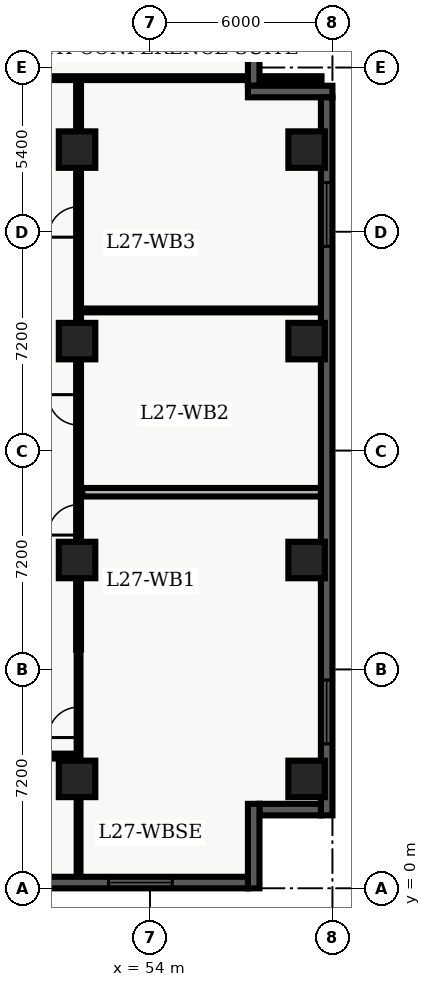
"""IFC4 building model, lengths in metres.
Left out: names, types, materials, properties, quantities, classifications, styles, units other than length and angle.
Written with IfcOpenShell. Run it as: python <this file> out.ifc"""

import sys

from ifc_helpers import new_model, entity, si_unit, converted_unit, direction, frame, origin_with_axes, origin_2d_with_axis, place, context, subcontext, project, spatial, polyline, rectangle, outline, extrude, element, fill, save


model = new_model("IFC4")
c1 = context("Model", 3, precision=1e-05, world=origin_with_axes(), true_north=direction((0.0, 1.0)))
c2 = subcontext(c1, "Body", "Model", "MODEL_VIEW")
j1 = project(units=[si_unit("LENGTHUNIT", "METRE"), converted_unit("PLANEANGLEUNIT", "DEGREE", entity("IfcPlaneAngleMeasure", 0.017), si_unit("PLANEANGLEUNIT", "RADIAN"), dimensions=[0, 0, 0, 0, 0, 0, 0])], contexts=[c1])
p1 = place(None, origin_with_axes())
s1 = spatial("IfcSite", under=j1, at=p1, CompositionType="ELEMENT")
p2 = place(p1, origin_with_axes())
s2 = spatial("IfcBuilding", under=s1, at=p2, CompositionType="ELEMENT")
p3 = place(p2, frame((0.0, 0.0, 112.5), z_axis=(0.0, 0.0, 1.0), x_axis=(1.0, 0.0, 0.0)))
s3 = spatial("IfcBuildingStorey", under=s2, at=p3, CompositionType="ELEMENT", Elevation=112.5)
for number, where, z_axis, x_axis in (
    (1, (51.6, 3.6, 0.0), (0.0, 0.0, 1.0), (1.0, 0.0, 0.0)),
    (2, (51.6, 10.8, 0.0), (0.0, 0.0, 1.0), (1.0, 0.0, 0.0)),
    (3, (51.6, 18.0, 0.0), (0.0, 0.0, 1.0), (1.0, 0.0, 0.0)),
    (4, (51.6, 24.3, 0.0), (0.0, 0.0, 1.0), (1.0, 0.0, 0.0)),
    (5, (59.15, 3.6, 0.0), (0.0, 0.0, 1.0), (1.0, 0.0, 0.0)),
    (6, (59.15, 10.8, 0.0), (0.0, 0.0, 1.0), (1.0, 0.0, 0.0)),
    (7, (59.15, 18.0, 0.0), (0.0, 0.0, 1.0), (1.0, 0.0, 0.0)),
    (8, (59.15, 24.3, 0.0), (0.0, 0.0, 1.0), (1.0, 0.0, 0.0)),
):
    element("IfcColumn", number, at=place(p3, frame(where, z_axis=z_axis, x_axis=x_axis)), inside=s3, PredefinedType="COLUMN", context=c2, shape_type="SweptSolid", body=[
        extrude(rectangle(XDim=1.2, YDim=1.2, at=origin_2d_with_axis()), origin_with_axes(), (0.0, 0.0, 1.0), 3.9),
    ])
p4 = place(p3, frame((51.65, 7.85, 0.0), z_axis=(0.0, 0.0, 1.0), x_axis=(0.0, 1.0, 0.0)))
e9 = element("IfcWall", 9, at=p4, inside=s3, PredefinedType="PARTITIONING", context=c2, shape_type="SweptSolid", body=[
    extrude(outline(polyline([(0.0, -0.08), (18.8, -0.08), (18.8, 0.08), (0.0, 0.08), (0.0, -0.08)])), origin_with_axes(), (0.0, 0.0, 1.0), 2.7),
])
p5 = place(p4, frame((4.27, 0.0, 0.0), z_axis=(0.0, 0.0, 1.0), x_axis=(1.0, 0.0, 0.0)))
e10 = element("IfcOpeningElement", 10, at=p5, cuts=e9, PredefinedType="OPENING", context=c2, shape_type="SweptSolid", body=[
    extrude(rectangle(XDim=1.0, YDim=0.18, at=origin_2d_with_axis()), origin_with_axes(), (0.0, 0.0, 1.0), 2.15),
])
p6 = place(p4, frame((7.889, 0.0, 0.0), z_axis=(0.0, 0.0, 1.0), x_axis=(1.0, 0.0, 0.0)))
e11 = element("IfcOpeningElement", 11, at=p6, cuts=e9, PredefinedType="OPENING", context=c2, shape_type="SweptSolid", body=[
    extrude(rectangle(XDim=1.0, YDim=0.18, at=origin_2d_with_axis()), origin_with_axes(), (0.0, 0.0, 1.0), 2.15),
])
p7 = place(p4, frame((14.069, 0.0, 0.0), z_axis=(0.0, 0.0, 1.0), x_axis=(1.0, 0.0, 0.0)))
e12 = element("IfcOpeningElement", 12, at=p7, cuts=e9, PredefinedType="OPENING", context=c2, shape_type="SweptSolid", body=[
    extrude(rectangle(XDim=1.0, YDim=0.18, at=origin_2d_with_axis()), origin_with_axes(), (0.0, 0.0, 1.0), 2.15),
])
p8 = place(p3, frame((38.76, 26.65, 0.0), z_axis=(0.0, 0.0, 1.0), x_axis=(1.0, 0.0, 0.0)))
e13 = element("IfcWall", 13, at=p8, inside=s3, PredefinedType="PARTITIONING", context=c2, shape_type="SweptSolid", body=[
    extrude(outline(polyline([(0.0, -0.062), (20.88, -0.062), (20.88, 0.062), (0.0, 0.062), (0.0, -0.062)])), origin_with_axes(), (0.0, 0.0, 1.0), 2.7),
])
p9 = place(p8, frame((4.24, 0.0, 0.0), z_axis=(0.0, 0.0, 1.0), x_axis=(1.0, 0.0, 0.0)))
e14 = element("IfcOpeningElement", 14, at=p9, cuts=e13, PredefinedType="OPENING", context=c2, shape_type="SweptSolid", body=[
    extrude(rectangle(XDim=1.0, YDim=0.145, at=origin_2d_with_axis()), origin_with_axes(), (0.0, 0.0, 1.0), 2.15),
])
p10 = place(p3, frame((44.55, 4.35, 0.0), z_axis=(0.0, 0.0, 1.0), x_axis=(1.0, 0.0, 0.0)))
e15 = element("IfcWall", 15, at=p10, inside=s3, PredefinedType="PARTITIONING", context=c2, shape_type="SweptSolid", body=[
    extrude(outline(polyline([(0.0, -0.08), (7.1, -0.08), (7.1, 0.08), (0.0, 0.08), (0.0, -0.08)])), origin_with_axes(), (0.0, 0.0, 1.0), 2.7),
])
p11 = place(p10, frame((1.7, 0.0, 0.0), z_axis=(0.0, 0.0, 1.0), x_axis=(1.0, 0.0, 0.0)))
e16 = element("IfcOpeningElement", 16, at=p11, cuts=e15, PredefinedType="OPENING", context=c2, shape_type="SweptSolid", body=[
    extrude(rectangle(XDim=1.0, YDim=0.18, at=origin_2d_with_axis()), origin_with_axes(), (0.0, 0.0, 1.0), 2.15),
])
p12 = place(p3, frame((51.65, 0.36, 0.0), z_axis=(0.0, 0.0, 1.0), x_axis=(0.0, 1.0, 0.0)))
e17 = element("IfcWall", 17, at=p12, inside=s3, PredefinedType="PARTITIONING", context=c2, shape_type="SweptSolid", body=[
    extrude(outline(polyline([(0.0, -0.062), (7.49, -0.062), (7.49, 0.062), (0.0, 0.062), (0.0, -0.062)])), origin_with_axes(), (0.0, 0.0, 1.0), 2.7),
])
p13 = place(p12, frame((5.1, 0.0, 0.0), z_axis=(0.0, 0.0, 1.0), x_axis=(1.0, 0.0, 0.0)))
e18 = element("IfcOpeningElement", 18, at=p13, cuts=e17, PredefinedType="OPENING", context=c2, shape_type="SweptSolid", body=[
    extrude(rectangle(XDim=1.0, YDim=0.145, at=origin_2d_with_axis()), origin_with_axes(), (0.0, 0.0, 1.0), 2.15),
])
p14 = place(p3, frame((51.77, 13.029, 0.0), z_axis=(0.0, 0.0, 1.0), x_axis=(1.0, 0.0, 0.0)))
e19 = element("IfcWall", 19, at=p14, inside=s3, PredefinedType="PARTITIONING", context=c2, shape_type="SweptSolid", body=[
    extrude(outline(polyline([(0.0, -0.14), (7.855, -0.14), (7.855, 0.14), (0.0, 0.14), (0.0, -0.14)])), origin_with_axes(), (0.0, 0.0, 1.0), 2.7),
])
p15 = place(p3, frame((51.77, 19.009, 0.0), z_axis=(0.0, 0.0, 1.0), x_axis=(1.0, 0.0, 0.0)))
e20 = element("IfcWall", 20, at=p15, inside=s3, PredefinedType="PARTITIONING", context=c2, shape_type="SweptSolid", body=[
    extrude(outline(polyline([(0.0, -0.062), (7.855, -0.062), (7.855, 0.062), (0.0, 0.062), (0.0, -0.062)])), origin_with_axes(), (0.0, 0.0, 1.0), 2.7),
])
p16 = place(p3, frame((57.41, 28.42, 0.0), z_axis=(0.0, 0.0, 1.0), x_axis=(0.0, -1.0, 0.0)))
e21 = element("IfcWall", 21, at=p16, inside=s3, PredefinedType="SOLIDWALL", context=c2, shape_type="SweptSolid", body=[
    extrude(outline(polyline([(0.0, -0.19), (2.02, -0.19), (2.02, 0.19), (0.0, 0.19), (0.0, -0.19)])), origin_with_axes(), (0.0, 0.0, 1.0), 3.66),
])
p17 = place(p3, frame((57.22, 26.21, 0.0), z_axis=(0.0, 0.0, 1.0), x_axis=(1.0, 0.0, 0.0)))
e22 = element("IfcWall", 22, at=p17, inside=s3, PredefinedType="SOLIDWALL", context=c2, shape_type="SweptSolid", body=[
    extrude(outline(polyline([(0.0, -0.19), (2.78, -0.19), (2.78, 0.19), (0.0, 0.19), (0.0, -0.19)])), origin_with_axes(), (0.0, 0.0, 1.0), 3.66),
])
p18 = place(p3, frame((59.81, 26.02, 0.0), z_axis=(0.0, 0.0, 1.0), x_axis=(0.0, -1.0, 0.0)))
e23 = element("IfcWall", 23, at=p18, inside=s3, PredefinedType="SOLIDWALL", context=c2, shape_type="SweptSolid", body=[
    extrude(outline(polyline([(0.0, -0.19), (23.62, -0.19), (23.62, 0.19), (0.0, 0.19), (0.0, -0.19)])), origin_with_axes(), (0.0, 0.0, 1.0), 3.66),
])
p19 = place(p18, frame((3.853, 0.0, 0.45), z_axis=(0.0, 0.0, 1.0), x_axis=(1.0, 0.0, 0.0)))
e24 = element("IfcOpeningElement", 24, at=p19, cuts=e23, PredefinedType="OPENING", context=c2, shape_type="SweptSolid", body=[
    extrude(rectangle(XDim=2.1, YDim=0.4, at=origin_2d_with_axis()), origin_with_axes(), (0.0, 0.0, 1.0), 2.2),
])
p20 = place(p18, frame((20.218, 0.0, 0.45), z_axis=(0.0, 0.0, 1.0), x_axis=(1.0, 0.0, 0.0)))
e25 = element("IfcOpeningElement", 25, at=p20, cuts=e23, PredefinedType="OPENING", context=c2, shape_type="SweptSolid", body=[
    extrude(rectangle(XDim=2.1, YDim=0.4, at=origin_2d_with_axis()), origin_with_axes(), (0.0, 0.0, 1.0), 2.2),
])
p21 = place(p3, frame((59.62, 2.59, 0.0), z_axis=(0.0, 0.0, 1.0), x_axis=(-1.0, 0.0, 0.0)))
e26 = element("IfcWall", 26, at=p21, inside=s3, PredefinedType="SOLIDWALL", context=c2, shape_type="SweptSolid", body=[
    extrude(outline(polyline([(0.0, -0.19), (2.02, -0.19), (2.02, 0.19), (0.0, 0.19), (0.0, -0.19)])), origin_with_axes(), (0.0, 0.0, 1.0), 3.66),
])
p22 = place(p3, frame((57.41, 2.78, 0.0), z_axis=(0.0, 0.0, 1.0), x_axis=(0.0, -1.0, 0.0)))
e27 = element("IfcWall", 27, at=p22, inside=s3, PredefinedType="SOLIDWALL", context=c2, shape_type="SweptSolid", body=[
    extrude(outline(polyline([(0.0, -0.19), (2.78, -0.19), (2.78, 0.19), (0.0, 0.19), (0.0, -0.19)])), origin_with_axes(), (0.0, 0.0, 1.0), 3.66),
])
p23 = place(p3, frame((57.22, 0.19, 0.0), z_axis=(0.0, 0.0, 1.0), x_axis=(-1.0, 0.0, 0.0)))
e28 = element("IfcWall", 28, at=p23, inside=s3, PredefinedType="SOLIDWALL", context=c2, shape_type="SweptSolid", body=[
    extrude(outline(polyline([(0.0, -0.19), (18.82, -0.19), (18.82, 0.19), (0.0, 0.19), (0.0, -0.19)])), origin_with_axes(), (0.0, 0.0, 1.0), 3.66),
])
p24 = place(p23, frame((3.537, 0.0, 0.45), z_axis=(0.0, 0.0, 1.0), x_axis=(1.0, 0.0, 0.0)))
e29 = element("IfcOpeningElement", 29, at=p24, cuts=e28, PredefinedType="OPENING", context=c2, shape_type="SweptSolid", body=[
    extrude(rectangle(XDim=2.1, YDim=0.4, at=origin_2d_with_axis()), origin_with_axes(), (0.0, 0.0, 1.0), 2.2),
])
p25 = place(p23, frame((9.41, 0.0, 0.45), z_axis=(0.0, 0.0, 1.0), x_axis=(1.0, 0.0, 0.0)))
e30 = element("IfcOpeningElement", 30, at=p25, cuts=e28, PredefinedType="OPENING", context=c2, shape_type="SweptSolid", body=[
    extrude(rectangle(XDim=2.1, YDim=0.4, at=origin_2d_with_axis()), origin_with_axes(), (0.0, 0.0, 1.0), 2.2),
])
p26 = place(p23, frame((15.283, 0.0, 0.45), z_axis=(0.0, 0.0, 1.0), x_axis=(1.0, 0.0, 0.0)))
e31 = element("IfcOpeningElement", 31, at=p26, cuts=e28, PredefinedType="OPENING", context=c2, shape_type="SweptSolid", body=[
    extrude(rectangle(XDim=2.1, YDim=0.4, at=origin_2d_with_axis()), origin_with_axes(), (0.0, 0.0, 1.0), 2.2),
])
p27 = place(p12, frame((5.1, 0.0, 0.0), z_axis=(0.0, 0.0, 1.0), x_axis=(1.0, 0.0, 0.0)))
e32 = element("IfcDoor", 32, at=p27, inside=s3, OperationType="SINGLE_SWING_LEFT", PredefinedType="DOOR", context=c2, shape_type="SweptSolid", body=[
    extrude(rectangle(XDim=1.0, YDim=0.075, at=origin_2d_with_axis()), origin_with_axes(), (0.0, 0.0, 1.0), 2.15),
])
fill(e18, e32)
p28 = place(p4, frame((4.27, 0.0, 0.0), z_axis=(0.0, 0.0, 1.0), x_axis=(1.0, 0.0, 0.0)))
e33 = element("IfcDoor", 33, at=p28, inside=s3, OperationType="SINGLE_SWING_LEFT", PredefinedType="DOOR", context=c2, shape_type="SweptSolid", body=[
    extrude(rectangle(XDim=1.0, YDim=0.09, at=origin_2d_with_axis()), origin_with_axes(), (0.0, 0.0, 1.0), 2.15),
])
fill(e10, e33)
p29 = place(p4, frame((7.889, 0.0, 0.0), z_axis=(0.0, 0.0, 1.0), x_axis=(1.0, 0.0, 0.0)))
e34 = element("IfcDoor", 34, at=p29, inside=s3, OperationType="SINGLE_SWING_RIGHT", PredefinedType="DOOR", context=c2, shape_type="SweptSolid", body=[
    extrude(rectangle(XDim=1.0, YDim=0.09, at=origin_2d_with_axis()), origin_with_axes(), (0.0, 0.0, 1.0), 2.15),
])
fill(e11, e34)
p30 = place(p4, frame((14.069, 0.0, 0.0), z_axis=(0.0, 0.0, 1.0), x_axis=(1.0, 0.0, 0.0)))
e35 = element("IfcDoor", 35, at=p30, inside=s3, OperationType="SINGLE_SWING_LEFT", PredefinedType="DOOR", context=c2, shape_type="SweptSolid", body=[
    extrude(rectangle(XDim=1.0, YDim=0.09, at=origin_2d_with_axis()), origin_with_axes(), (0.0, 0.0, 1.0), 2.15),
])
fill(e12, e35)
p31 = place(p18, frame((3.853, 0.0, 0.45), z_axis=(0.0, 0.0, 1.0), x_axis=(1.0, 0.0, 0.0)))
e36 = element("IfcWindow", 36, at=p31, inside=s3, PredefinedType="WINDOW", context=c2, shape_type="SweptSolid", body=[
    extrude(rectangle(XDim=2.1, YDim=0.09, at=origin_2d_with_axis()), origin_with_axes(), (0.0, 0.0, 1.0), 2.2),
])
fill(e24, e36)
p32 = place(p18, frame((20.218, 0.0, 0.45), z_axis=(0.0, 0.0, 1.0), x_axis=(1.0, 0.0, 0.0)))
e37 = element("IfcWindow", 37, at=p32, inside=s3, PredefinedType="WINDOW", context=c2, shape_type="SweptSolid", body=[
    extrude(rectangle(XDim=2.1, YDim=0.09, at=origin_2d_with_axis()), origin_with_axes(), (0.0, 0.0, 1.0), 2.2),
])
fill(e25, e37)
p33 = place(p23, frame((3.537, 0.0, 0.45), z_axis=(0.0, 0.0, 1.0), x_axis=(1.0, 0.0, 0.0)))
e38 = element("IfcWindow", 38, at=p33, inside=s3, PredefinedType="WINDOW", context=c2, shape_type="SweptSolid", body=[
    extrude(rectangle(XDim=2.1, YDim=0.09, at=origin_2d_with_axis()), origin_with_axes(), (0.0, 0.0, 1.0), 2.2),
])
fill(e29, e38)
save(model, sys.argv[1])
